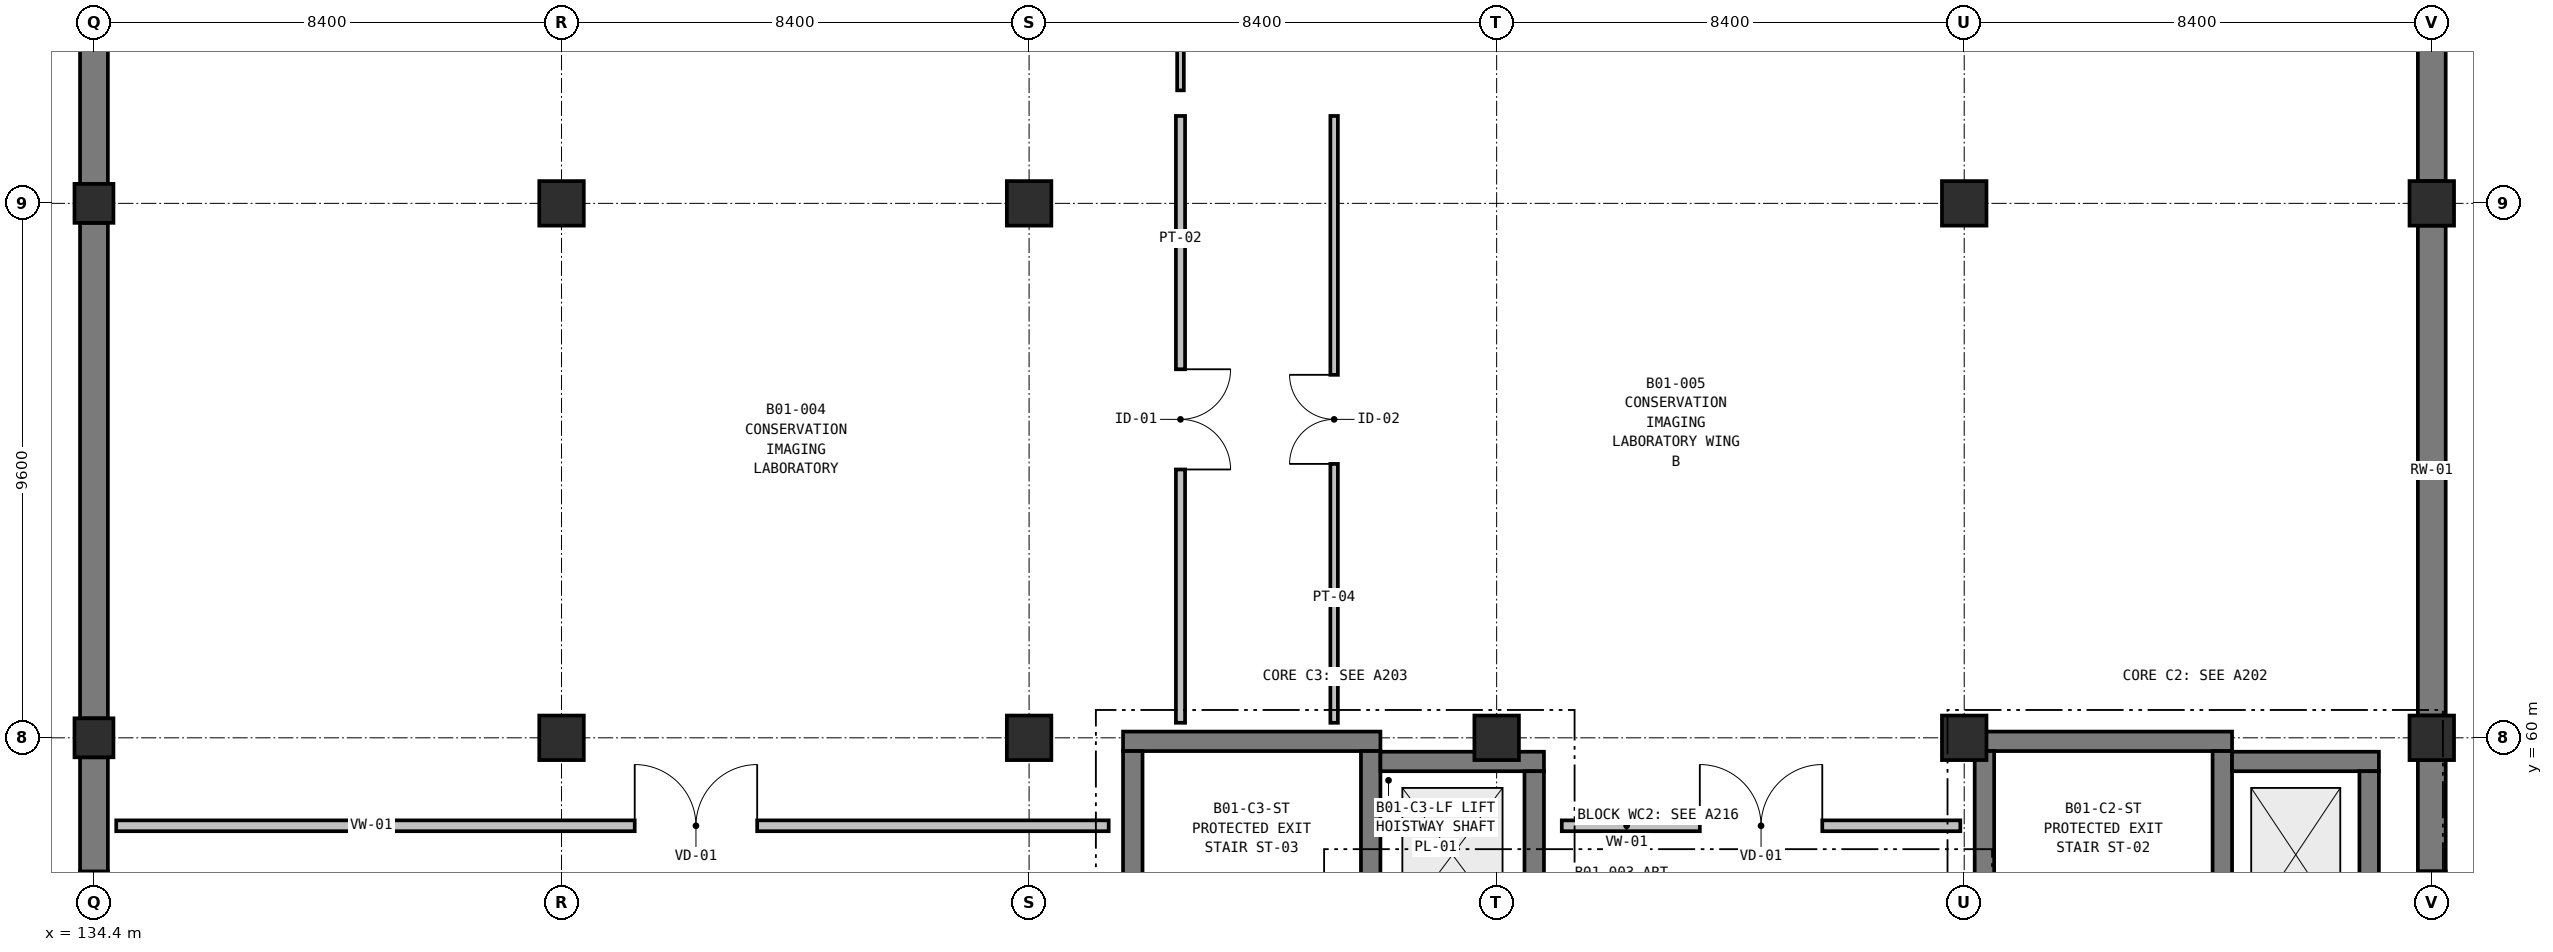
"""IFC4 building model, lengths in metres.
Left out: names, types, materials, properties, quantities, classifications, styles, units other than length and angle.
Written with IfcOpenShell. Run it as: python <this file> out.ifc"""

import sys

from ifc_helpers import new_model, si_unit, direction, frame, frame_2d, origin, origin_2d, place, context, subcontext, project, spatial, rectangle, extrude, element, fill, save


model = new_model("IFC4")
c1 = context("Model", 3, precision=1e-05, world=origin(), true_north=direction((0.0, 1.0)))
c2 = subcontext(c1, "Body", "Model", "MODEL_VIEW")
j1 = project(units=[si_unit("LENGTHUNIT", "METRE"), si_unit("PLANEANGLEUNIT", "RADIAN")], contexts=[c1])
p1 = place(None, origin())
s1 = spatial("IfcSite", under=j1, at=p1, CompositionType="ELEMENT")
p2 = place(p1, origin())
s2 = spatial("IfcBuilding", under=s1, at=p2, CompositionType="ELEMENT")
p3 = place(p2, frame((0.0, 0.0, -5.4)))
s3 = spatial("IfcBuildingStorey", under=s2, at=p3, CompositionType="ELEMENT", Elevation=-5.4)
for number, where, z_axis, x_axis in (
    (1, (134.4, 60.0, 0.0), (0.0, 0.0, 1.0), (1.0, 0.0, 0.0)),
    (2, (134.4, 69.6, 0.0), (0.0, 0.0, 1.0), (1.0, 0.0, 0.0)),
):
    element("IfcColumn", number, at=place(p3, frame(where, z_axis=z_axis, x_axis=x_axis)), inside=s3, PredefinedType="COLUMN", context=c2, shape_type="SweptSolid", body=[
        extrude(rectangle(XDim=0.7, YDim=0.7, at=origin_2d()), origin(), (0.0, 0.0, 1.0), 5.4),
    ])
for number, where, z_axis, x_axis in (
    (3, (142.8, 60.0, 0.0), (0.0, 0.0, 1.0), (1.0, 0.0, 0.0)),
    (4, (142.8, 69.6, 0.0), (0.0, 0.0, 1.0), (1.0, 0.0, 0.0)),
    (5, (151.2, 60.0, 0.0), (0.0, 0.0, 1.0), (1.0, 0.0, 0.0)),
    (6, (151.2, 69.6, 0.0), (0.0, 0.0, 1.0), (1.0, 0.0, 0.0)),
    (7, (159.6, 60.0, 0.0), (0.0, 0.0, 1.0), (1.0, 0.0, 0.0)),
    (8, (168.0, 60.0, 0.0), (0.0, 0.0, 1.0), (1.0, 0.0, 0.0)),
    (9, (168.0, 69.6, 0.0), (0.0, 0.0, 1.0), (1.0, 0.0, 0.0)),
    (10, (176.4, 60.0, 0.0), (0.0, 0.0, 1.0), (1.0, 0.0, 0.0)),
    (11, (176.4, 69.6, 0.0), (0.0, 0.0, 1.0), (1.0, 0.0, 0.0)),
):
    element("IfcColumn", number, at=place(p3, frame(where, z_axis=z_axis, x_axis=x_axis)), inside=s3, PredefinedType="COLUMN", context=c2, shape_type="SweptSolid", body=[
        extrude(rectangle(XDim=0.8, YDim=0.8, at=origin_2d()), origin(), (0.0, 0.0, 1.0), 5.4),
    ])
for number, where, z_axis, x_axis in (
    (12, (176.4, 78.8, 0.0), (0.0, 0.0, 1.0), (0.0, -1.0, 0.0)),
    (13, (176.4, 69.2, 0.0), (0.0, 0.0, 1.0), (0.0, -1.0, 0.0)),
):
    element("IfcWall", number, at=place(p3, frame(where, z_axis=z_axis, x_axis=x_axis)), inside=s3, PredefinedType="USERDEFINED", context=c2, shape_type="SweptSolid", body=[
        extrude(rectangle(XDim=8.8, YDim=0.5, at=frame_2d((4.4, 0.0))), origin(), (0.0, 0.0, 1.0), 5.06),
    ])
p4 = place(p3, frame((176.4, 59.6, 0.0), z_axis=(0.0, 0.0, 1.0), x_axis=(0.0, -1.0, 0.0)))
e14 = element("IfcWall", 14, at=p4, inside=s3, PredefinedType="USERDEFINED", context=c2, shape_type="SweptSolid", body=[
    extrude(rectangle(XDim=2.0, YDim=0.5, at=frame_2d((1.0, 0.0))), origin(), (0.0, 0.0, 1.0), 5.06),
])
p5 = place(p3, frame((176.4, 57.6, 0.0), z_axis=(0.0, 0.0, 1.0), x_axis=(0.0, -1.0, 0.0)))
e15 = element("IfcWall", 15, at=p5, inside=s3, PredefinedType="USERDEFINED", context=c2, shape_type="SweptSolid", body=[
    extrude(rectangle(XDim=6.8, YDim=0.5, at=frame_2d((3.4, 0.0))), origin(), (0.0, 0.0, 1.0), 5.06),
])
p6 = place(p3, frame((134.4, 50.75, 0.0), z_axis=(0.0, 0.0, 1.0), x_axis=(0.0, 1.0, 0.0)))
e16 = element("IfcWall", 16, at=p6, inside=s3, PredefinedType="USERDEFINED", context=c2, shape_type="SweptSolid", body=[
    extrude(rectangle(XDim=6.85, YDim=0.5, at=frame_2d((3.425, 0.0))), origin(), (0.0, 0.0, 1.0), 5.06),
])
p7 = place(p3, frame((134.4, 57.6, 0.0), z_axis=(0.0, 0.0, 1.0), x_axis=(0.0, 1.0, 0.0)))
e17 = element("IfcWall", 17, at=p7, inside=s3, PredefinedType="USERDEFINED", context=c2, shape_type="SweptSolid", body=[
    extrude(rectangle(XDim=2.05, YDim=0.5, at=frame_2d((1.025, 0.0))), origin(), (0.0, 0.0, 1.0), 5.06),
])
p8 = place(p3, frame((134.4, 60.35, 0.0), z_axis=(0.0, 0.0, 1.0), x_axis=(0.0, 1.0, 0.0)))
e18 = element("IfcWall", 18, at=p8, inside=s3, PredefinedType="USERDEFINED", context=c2, shape_type="SweptSolid", body=[
    extrude(rectangle(XDim=8.9, YDim=0.5, at=frame_2d((4.45, 0.0))), origin(), (0.0, 0.0, 1.0), 5.06),
])
p9 = place(p3, frame((134.4, 69.95, 0.0), z_axis=(0.0, 0.0, 1.0), x_axis=(0.0, 1.0, 0.0)))
e19 = element("IfcWall", 19, at=p9, inside=s3, PredefinedType="USERDEFINED", context=c2, shape_type="SweptSolid", body=[
    extrude(rectangle(XDim=8.9, YDim=0.5, at=frame_2d((4.45, 0.0))), origin(), (0.0, 0.0, 1.0), 5.06),
])
p10 = place(p3, frame((168.188, 59.937, 0.0), z_axis=(0.0, 0.0, 1.0), x_axis=(1.0, 0.0, 0.0)))
e20 = element("IfcWall", 20, at=p10, inside=s3, PredefinedType="SHEAR", context=c2, shape_type="SweptSolid", body=[
    extrude(rectangle(XDim=4.624, YDim=0.35, at=frame_2d((2.312, 0.0))), origin(), (0.0, 0.0, 1.0), 5.06),
])
for number, where, z_axis, x_axis in (
    (21, (172.637, 59.762, 0.0), (0.0, 0.0, 1.0), (0.0, -1.0, 0.0)),
    (22, (168.363, 50.638, 0.0), (0.0, 0.0, 1.0), (0.0, 1.0, 0.0)),
):
    element("IfcWall", number, at=place(p3, frame(where, z_axis=z_axis, x_axis=x_axis)), inside=s3, PredefinedType="SHEAR", context=c2, shape_type="SweptSolid", body=[
        extrude(rectangle(XDim=9.124, YDim=0.35, at=frame_2d((4.562, 0.0))), origin(), (0.0, 0.0, 1.0), 5.06),
    ])
p11 = place(p3, frame((172.812, 59.575, 0.0), z_axis=(0.0, 0.0, 1.0), x_axis=(1.0, 0.0, 0.0)))
e23 = element("IfcWall", 23, at=p11, inside=s3, PredefinedType="SHEAR", context=c2, shape_type="SweptSolid", body=[
    extrude(rectangle(XDim=2.638, YDim=0.35, at=frame_2d((1.319, 0.0))), origin(), (0.0, 0.0, 1.0), 5.06),
])
p12 = place(p3, frame((175.275, 59.4, 0.0), z_axis=(0.0, 0.0, 1.0), x_axis=(0.0, -1.0, 0.0)))
e24 = element("IfcWall", 24, at=p12, inside=s3, PredefinedType="SHEAR", context=c2, shape_type="SweptSolid", body=[
    extrude(rectangle(XDim=3.0, YDim=0.35, at=frame_2d((1.5, 0.0))), origin(), (0.0, 0.0, 1.0), 5.06),
])
p13 = place(p3, frame((152.888, 59.937, 0.0), z_axis=(0.0, 0.0, 1.0), x_axis=(1.0, 0.0, 0.0)))
e25 = element("IfcWall", 25, at=p13, inside=s3, PredefinedType="SHEAR", context=c2, shape_type="SweptSolid", body=[
    extrude(rectangle(XDim=4.624, YDim=0.35, at=frame_2d((2.312, 0.0))), origin(), (0.0, 0.0, 1.0), 5.06),
])
for number, where, z_axis, x_axis in (
    (26, (157.337, 59.762, 0.0), (0.0, 0.0, 1.0), (0.0, -1.0, 0.0)),
    (27, (153.063, 50.638, 0.0), (0.0, 0.0, 1.0), (0.0, 1.0, 0.0)),
):
    element("IfcWall", number, at=place(p3, frame(where, z_axis=z_axis, x_axis=x_axis)), inside=s3, PredefinedType="SHEAR", context=c2, shape_type="SweptSolid", body=[
        extrude(rectangle(XDim=9.124, YDim=0.35, at=frame_2d((4.562, 0.0))), origin(), (0.0, 0.0, 1.0), 5.06),
    ])
p14 = place(p3, frame((157.512, 59.575, 0.0), z_axis=(0.0, 0.0, 1.0), x_axis=(1.0, 0.0, 0.0)))
e28 = element("IfcWall", 28, at=p14, inside=s3, PredefinedType="SHEAR", context=c2, shape_type="SweptSolid", body=[
    extrude(rectangle(XDim=2.938, YDim=0.35, at=frame_2d((1.469, 0.0))), origin(), (0.0, 0.0, 1.0), 5.06),
])
p15 = place(p3, frame((160.275, 59.4, 0.0), z_axis=(0.0, 0.0, 1.0), x_axis=(0.0, -1.0, 0.0)))
e29 = element("IfcWall", 29, at=p15, inside=s3, PredefinedType="SHEAR", context=c2, shape_type="SweptSolid", body=[
    extrude(rectangle(XDim=3.0, YDim=0.35, at=frame_2d((1.5, 0.0))), origin(), (0.0, 0.0, 1.0), 5.06),
])
p16 = place(p3, frame((134.8, 58.42, 0.0), z_axis=(0.0, 0.0, 1.0), x_axis=(1.0, 0.0, 0.0)))
e30 = element("IfcWall", 30, at=p16, inside=s3, PredefinedType="PARTITIONING", context=c2, shape_type="SweptSolid", body=[
    extrude(rectangle(XDim=17.83, YDim=0.195, at=frame_2d((8.915, 0.0))), origin(), (0.0, 0.0, 1.0), 4.235),
])
p17 = place(p16, frame((9.315, 0.0, 0.0)))
e31 = element("IfcOpeningElement", 31, at=p17, cuts=e30, PredefinedType="OPENING", context=c2, shape_type="SweptSolid", body=[
    extrude(rectangle(XDim=2.2, YDim=2.6, at=frame_2d((1.1, 1.3))), frame((0.0, 0.107, 0.0), z_axis=(0.0, -1.0, 0.0), x_axis=(1.0, 0.0, 0.0)), (0.0, 0.0, 1.0), 0.215),
])
p18 = place(p3, frame((160.77, 58.42, 0.0), z_axis=(0.0, 0.0, 1.0), x_axis=(1.0, 0.0, 0.0)))
e32 = element("IfcWall", 32, at=p18, inside=s3, PredefinedType="PARTITIONING", context=c2, shape_type="SweptSolid", body=[
    extrude(rectangle(XDim=7.16, YDim=0.195, at=frame_2d((3.58, 0.0))), origin(), (0.0, 0.0, 1.0), 4.235),
])
p19 = place(p18, frame((2.48, 0.0, 0.0)))
e33 = element("IfcOpeningElement", 33, at=p19, cuts=e32, PredefinedType="OPENING", context=c2, shape_type="SweptSolid", body=[
    extrude(rectangle(XDim=2.2, YDim=2.6, at=frame_2d((1.1, 1.3))), frame((0.0, 0.107, 0.0), z_axis=(0.0, -1.0, 0.0), x_axis=(1.0, 0.0, 0.0)), (0.0, 0.0, 1.0), 0.215),
])
p20 = place(p3, frame((153.92, 71.17, 0.0), z_axis=(0.0, 0.0, 1.0), x_axis=(0.0, -1.0, 0.0)))
e34 = element("IfcWall", 34, at=p20, inside=s3, PredefinedType="PARTITIONING", context=c2, shape_type="SweptSolid", body=[
    extrude(rectangle(XDim=10.9, YDim=0.165, at=frame_2d((5.45, 0.0))), origin(), (0.0, 0.0, 1.0), 4.185),
])
p21 = place(p20, frame((4.55, 0.0, 0.0)))
e35 = element("IfcOpeningElement", 35, at=p21, cuts=e34, PredefinedType="OPENING", context=c2, shape_type="SweptSolid", body=[
    extrude(rectangle(XDim=1.8, YDim=2.4, at=frame_2d((0.9, 1.2))), frame((0.0, 0.093, 0.0), z_axis=(0.0, -1.0, 0.0), x_axis=(1.0, 0.0, 0.0)), (0.0, 0.0, 1.0), 0.185),
])
p22 = place(p3, frame((156.68, 60.27, 0.0), z_axis=(0.0, 0.0, 1.0), x_axis=(0.0, 1.0, 0.0)))
e36 = element("IfcWall", 36, at=p22, inside=s3, PredefinedType="PARTITIONING", context=c2, shape_type="SweptSolid", body=[
    extrude(rectangle(XDim=10.9, YDim=0.135, at=frame_2d((5.45, 0.0))), origin(), (0.0, 0.0, 1.0), 4.185),
])
p23 = place(p22, frame((4.65, 0.0, 0.0)))
e37 = element("IfcOpeningElement", 37, at=p23, cuts=e36, PredefinedType="OPENING", context=c2, shape_type="SweptSolid", body=[
    extrude(rectangle(XDim=1.6, YDim=2.35, at=frame_2d((0.8, 1.175))), frame((0.0, 0.077, 0.0), z_axis=(0.0, -1.0, 0.0), x_axis=(1.0, 0.0, 0.0)), (0.0, 0.0, 1.0), 0.155),
])
p24 = place(p3, frame((153.92, 84.07, 0.0), z_axis=(0.0, 0.0, 1.0), x_axis=(0.0, -1.0, 0.0)))
e38 = element("IfcWall", 38, at=p24, inside=s3, PredefinedType="PARTITIONING", context=c2, shape_type="SweptSolid", body=[
    extrude(rectangle(XDim=12.44, YDim=0.12, at=frame_2d((6.22, 0.0))), origin(), (0.0, 0.0, 1.0), 4.385),
])
p25 = place(p24, frame((5.52, 0.0, 0.0)))
e39 = element("IfcOpeningElement", 39, at=p25, cuts=e38, PredefinedType="OPENING", context=c2, shape_type="SweptSolid", body=[
    extrude(rectangle(XDim=1.4, YDim=2.3, at=frame_2d((0.7, 1.15))), frame((0.0, 0.07, 0.0), z_axis=(0.0, -1.0, 0.0), x_axis=(1.0, 0.0, 0.0)), (0.0, 0.0, 1.0), 0.14),
])
p26 = place(p17, origin())
e40 = element("IfcDoor", 40, at=p26, inside=s3, OperationType="DOUBLE_DOOR_SINGLE_SWING", PredefinedType="DOOR", context=c2, shape_type="SweptSolid", body=[
    extrude(rectangle(XDim=2.2, YDim=2.6, at=frame_2d((1.1, 1.3))), frame((0.0, 0.025, 0.0), z_axis=(0.0, -1.0, 0.0), x_axis=(1.0, 0.0, 0.0)), (0.0, 0.0, 1.0), 0.05),
])
fill(e31, e40)
p27 = place(p19, origin())
e41 = element("IfcDoor", 41, at=p27, inside=s3, OperationType="DOUBLE_DOOR_SINGLE_SWING", PredefinedType="DOOR", context=c2, shape_type="SweptSolid", body=[
    extrude(rectangle(XDim=2.2, YDim=2.6, at=frame_2d((1.1, 1.3))), frame((0.0, 0.025, 0.0), z_axis=(0.0, -1.0, 0.0), x_axis=(1.0, 0.0, 0.0)), (0.0, 0.0, 1.0), 0.05),
])
fill(e33, e41)
p28 = place(p21, origin())
e42 = element("IfcDoor", 42, at=p28, inside=s3, OperationType="DOUBLE_DOOR_SINGLE_SWING", PredefinedType="DOOR", context=c2, shape_type="SweptSolid", body=[
    extrude(rectangle(XDim=1.8, YDim=2.4, at=frame_2d((0.9, 1.2))), frame((0.0, 0.025, 0.0), z_axis=(0.0, -1.0, 0.0), x_axis=(1.0, 0.0, 0.0)), (0.0, 0.0, 1.0), 0.05),
])
fill(e35, e42)
p29 = place(p23, origin())
e43 = element("IfcDoor", 43, at=p29, inside=s3, OperationType="DOUBLE_DOOR_SINGLE_SWING", PredefinedType="DOOR", context=c2, shape_type="SweptSolid", body=[
    extrude(rectangle(XDim=1.6, YDim=2.35, at=frame_2d((0.8, 1.175))), frame((0.0, 0.025, 0.0), z_axis=(0.0, -1.0, 0.0), x_axis=(1.0, 0.0, 0.0)), (0.0, 0.0, 1.0), 0.05),
])
fill(e37, e43)
save(model, sys.argv[1])
